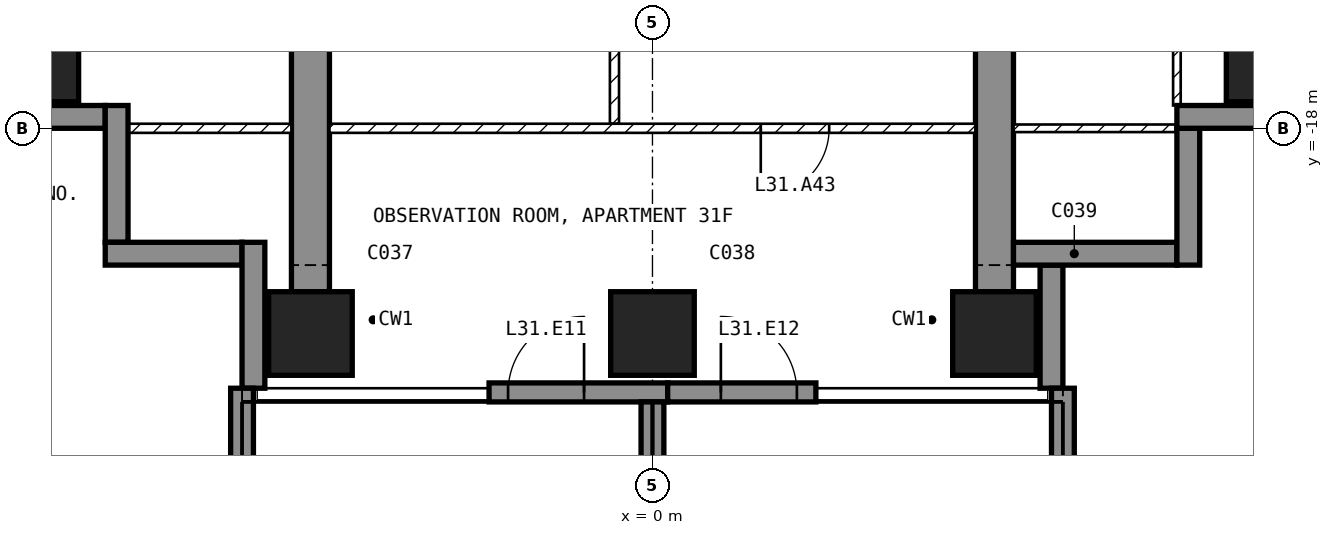
"""IFC4 building model, lengths in metres.
Left out: names, types, materials, properties, quantities, classifications, styles, units other than length and angle.
Written with IfcOpenShell. Run it as: python <this file> out.ifc"""

import sys

from ifc_helpers import new_model, si_unit, direction, frame, frame_2d, origin, origin_2d, place, context, subcontext, project, spatial, polyline, rectangle, outline, extrude, element, fill, save


model = new_model("IFC4")
c1 = context("Model", 3, precision=1e-05, world=origin(), true_north=direction((0.0, 1.0)))
c2 = subcontext(c1, "Body", "Model", "MODEL_VIEW")
j1 = project(units=[si_unit("LENGTHUNIT", "METRE"), si_unit("PLANEANGLEUNIT", "RADIAN")], contexts=[c1])
p1 = place(None, origin())
s1 = spatial("IfcSite", under=j1, at=p1, CompositionType="ELEMENT")
p2 = place(p1, origin())
s2 = spatial("IfcBuilding", under=s1, at=p2, CompositionType="ELEMENT")
p3 = place(p2, frame((0.0, 0.0, 130.4)))
s3 = spatial("IfcBuildingStorey", under=s2, at=p3, CompositionType="ELEMENT", Elevation=130.4)
for number, where, z_axis, x_axis in (
    (1, (-8.1, -17.1, -0.25), (0.0, 0.0, 1.0), (1.0, 0.0, 0.0)),
    (2, (-4.5, -20.7, -0.25), (0.0, 0.0, 1.0), (1.0, 0.0, 0.0)),
    (3, (0.0, -20.7, -0.25), (0.0, 0.0, 1.0), (1.0, 0.0, 0.0)),
    (4, (4.5, -20.7, -0.25), (0.0, 0.0, 1.0), (1.0, 0.0, 0.0)),
    (5, (8.1, -17.1, -0.25), (0.0, 0.0, 1.0), (1.0, 0.0, 0.0)),
):
    element("IfcColumn", number, at=place(p3, frame(where, z_axis=z_axis, x_axis=x_axis)), inside=s3, PredefinedType="COLUMN", context=c2, shape_type="SweptSolid", body=[
        extrude(rectangle(XDim=1.1, YDim=1.1, at=origin_2d()), origin(), (0.0, 0.0, 1.0), 3.5),
    ])
for number, where, z_axis, x_axis in (
    (6, (-4.75, -20.15, -0.25), (1.0, 0.0, 0.0), (0.0, 1.0, 0.0)),
    (7, (4.25, -20.15, -0.25), (1.0, 0.0, 0.0), (0.0, 1.0, 0.0)),
):
    element("IfcWall", number, at=place(p3, frame(where, z_axis=z_axis, x_axis=x_axis)), inside=s3, PredefinedType="SHEAR", context=c2, shape_type="SweptSolid", body=[
        extrude(outline(polyline([(0.0, 0.0), (6.65, 0.0), (6.65, 2.65), (9.05, 2.65), (9.05, 0.0), (11.15, 0.0), (11.15, 3.5), (0.0, 3.5), (0.0, 0.0)])), origin(), (0.0, 0.0, 1.0), 0.5),
    ])
p4 = place(p3, frame((-2.15, -21.475, 0.0), z_axis=(0.0, 0.0, 1.0), x_axis=(1.0, 0.0, 0.0)))
e8 = element("IfcWall", 8, at=p4, inside=s3, PredefinedType="SOLIDWALL", context=c2, shape_type="SweptSolid", body=[
    extrude(rectangle(XDim=2.35, YDim=0.25, at=frame_2d((1.175, 0.0))), origin(), (0.0, 0.0, 1.0), 3.25),
])
p5 = place(p4, frame((0.25, 0.0, 0.0)))
e9 = element("IfcOpeningElement", 9, at=p5, cuts=e8, PredefinedType="OPENING", context=c2, shape_type="SweptSolid", body=[
    extrude(rectangle(XDim=1.0, YDim=2.4, at=frame_2d((0.5, 1.2))), frame((0.0, 0.135, 0.0), z_axis=(0.0, -1.0, 0.0), x_axis=(1.0, 0.0, 0.0)), (0.0, 0.0, 1.0), 0.27),
])
p6 = place(p3, frame((0.2, -21.475, 0.0), z_axis=(0.0, 0.0, 1.0), x_axis=(1.0, 0.0, 0.0)))
e10 = element("IfcWall", 10, at=p6, inside=s3, PredefinedType="SOLIDWALL", context=c2, shape_type="SweptSolid", body=[
    extrude(rectangle(XDim=1.95, YDim=0.25, at=frame_2d((0.975, 0.0))), origin(), (0.0, 0.0, 1.0), 3.25),
])
p7 = place(p6, frame((0.7, 0.0, 0.0)))
e11 = element("IfcOpeningElement", 11, at=p7, cuts=e10, PredefinedType="OPENING", context=c2, shape_type="SweptSolid", body=[
    extrude(rectangle(XDim=1.0, YDim=2.4, at=frame_2d((0.5, 1.2))), frame((0.0, 0.135, 0.0), z_axis=(0.0, -1.0, 0.0), x_axis=(1.0, 0.0, 0.0)), (0.0, 0.0, 1.0), 0.27),
])
p8 = place(p3, frame((5.25, -21.42, 0.0), z_axis=(0.0, 0.0, 1.0), x_axis=(0.0, 1.0, 0.0)))
e12 = element("IfcWall", 12, at=p8, inside=s3, PredefinedType="SOLIDWALL", context=c2, shape_type="SweptSolid", body=[
    extrude(rectangle(XDim=1.62, YDim=0.3, at=frame_2d((0.81, 0.0))), origin(), (0.0, 0.0, 1.0), 3.25),
])
p9 = place(p3, frame((4.75, -19.65, 0.0), z_axis=(0.0, 0.0, 1.0), x_axis=(1.0, 0.0, 0.0)))
e13 = element("IfcWall", 13, at=p9, inside=s3, PredefinedType="SOLIDWALL", context=c2, shape_type="SweptSolid", body=[
    extrude(rectangle(XDim=2.15, YDim=0.3, at=frame_2d((1.075, 0.0))), origin(), (0.0, 0.0, 1.0), 3.25),
])
p10 = place(p3, frame((7.05, -19.8, 0.0), z_axis=(0.0, 0.0, 1.0), x_axis=(0.0, 1.0, 0.0)))
e14 = element("IfcWall", 14, at=p10, inside=s3, PredefinedType="SOLIDWALL", context=c2, shape_type="SweptSolid", body=[
    extrude(rectangle(XDim=1.8, YDim=0.3, at=frame_2d((0.9, 0.0))), origin(), (0.0, 0.0, 1.0), 3.25),
])
p11 = place(p3, frame((6.9, -17.85, 0.0), z_axis=(0.0, 0.0, 1.0), x_axis=(1.0, 0.0, 0.0)))
e15 = element("IfcWall", 15, at=p11, inside=s3, PredefinedType="SOLIDWALL", context=c2, shape_type="SweptSolid", body=[
    extrude(rectangle(XDim=1.85, YDim=0.3, at=frame_2d((0.925, 0.0))), origin(), (0.0, 0.0, 1.0), 3.25),
])
p12 = place(p3, frame((-8.75, -17.85, 0.0), z_axis=(0.0, 0.0, 1.0), x_axis=(1.0, 0.0, 0.0)))
e16 = element("IfcWall", 16, at=p12, inside=s3, PredefinedType="SOLIDWALL", context=c2, shape_type="SweptSolid", body=[
    extrude(rectangle(XDim=1.55, YDim=0.3, at=frame_2d((0.775, 0.0))), origin(), (0.0, 0.0, 1.0), 3.25),
])
for number, where, z_axis, x_axis in (
    (17, (-7.05, -17.7, 0.0), (0.0, 0.0, 1.0), (0.0, -1.0, 0.0)),
    (18, (-7.2, -19.65, 0.0), (0.0, 0.0, 1.0), (1.0, 0.0, 0.0)),
):
    element("IfcWall", number, at=place(p3, frame(where, z_axis=z_axis, x_axis=x_axis)), inside=s3, PredefinedType="SOLIDWALL", context=c2, shape_type="SweptSolid", body=[
        extrude(rectangle(XDim=1.8, YDim=0.3, at=frame_2d((0.9, 0.0))), origin(), (0.0, 0.0, 1.0), 3.25),
    ])
p13 = place(p3, frame((-5.25, -19.5, 0.0), z_axis=(0.0, 0.0, 1.0), x_axis=(0.0, -1.0, 0.0)))
e19 = element("IfcWall", 19, at=p13, inside=s3, PredefinedType="SOLIDWALL", context=c2, shape_type="SweptSolid", body=[
    extrude(rectangle(XDim=1.92, YDim=0.3, at=frame_2d((0.96, 0.0))), origin(), (0.0, 0.0, 1.0), 3.25),
])
p14 = place(p3, frame((-5.4, -21.42, 0.0), z_axis=(0.0, 0.0, 1.0), x_axis=(0.0, -1.0, 0.0)))
e20 = element("IfcWall", 20, at=p14, inside=s3, PredefinedType="SOLIDWALL", context=c2, shape_type="SweptSolid", body=[
    extrude(rectangle(XDim=2.88, YDim=0.3, at=frame_2d((1.44, 0.0))), origin(), (0.0, 0.0, 1.0), 3.25),
])
p15 = place(p3, frame((0.0, -21.6, 0.0), z_axis=(0.0, 0.0, 1.0), x_axis=(0.0, -1.0, 0.0)))
e21 = element("IfcWall", 21, at=p15, inside=s3, PredefinedType="SOLIDWALL", context=c2, shape_type="SweptSolid", body=[
    extrude(rectangle(XDim=2.7, YDim=0.3, at=frame_2d((1.35, 0.0))), origin(), (0.0, 0.0, 1.0), 3.25),
])
p16 = place(p3, frame((5.4, -21.42, 0.0), z_axis=(0.0, 0.0, 1.0), x_axis=(0.0, -1.0, 0.0)))
e22 = element("IfcWall", 22, at=p16, inside=s3, PredefinedType="SOLIDWALL", context=c2, shape_type="SweptSolid", body=[
    extrude(rectangle(XDim=2.88, YDim=0.3, at=frame_2d((1.44, 0.0))), origin(), (0.0, 0.0, 1.0), 3.25),
])
p17 = place(p3, frame((-0.5, -17.94, 0.0), z_axis=(0.0, 0.0, 1.0), x_axis=(0.0, 1.0, 0.0)))
e23 = element("IfcWall", 23, at=p17, inside=s3, PredefinedType="PARTITIONING", context=c2, shape_type="SweptSolid", body=[
    extrude(rectangle(XDim=2.88, YDim=0.12, at=frame_2d((1.44, 0.0))), origin(), (0.0, 0.0, 1.0), 3.25),
])
p18 = place(p17, frame((0.99, 0.0, 0.0)))
e24 = element("IfcOpeningElement", 24, at=p18, cuts=e23, PredefinedType="OPENING", context=c2, shape_type="SweptSolid", body=[
    extrude(rectangle(XDim=0.9, YDim=2.1, at=frame_2d((0.45, 1.05))), frame((0.0, 0.07, 0.0), z_axis=(0.0, -1.0, 0.0), x_axis=(1.0, 0.0, 0.0)), (0.0, 0.0, 1.0), 0.14),
])
p19 = place(p3, frame((4.25, -18.0, 0.0), z_axis=(0.0, 0.0, 1.0), x_axis=(-1.0, 0.0, 0.0)))
e25 = element("IfcWall", 25, at=p19, inside=s3, PredefinedType="PARTITIONING", context=c2, shape_type="SweptSolid", body=[
    extrude(rectangle(XDim=8.5, YDim=0.12, at=frame_2d((4.25, 0.0))), origin(), (0.0, 0.0, 1.0), 3.25),
])
p20 = place(p19, frame((1.925, 0.0, 0.0)))
e26 = element("IfcOpeningElement", 26, at=p20, cuts=e25, PredefinedType="OPENING", context=c2, shape_type="SweptSolid", body=[
    extrude(rectangle(XDim=0.9, YDim=2.1, at=frame_2d((0.45, 1.05))), frame((0.0, 0.07, 0.0), z_axis=(0.0, -1.0, 0.0), x_axis=(1.0, 0.0, 0.0)), (0.0, 0.0, 1.0), 0.14),
])
p21 = place(p3, frame((6.9, -17.7, 0.0), z_axis=(0.0, 0.0, 1.0), x_axis=(0.0, 1.0, 0.0)))
e27 = element("IfcWall", 27, at=p21, inside=s3, PredefinedType="PARTITIONING", context=c2, shape_type="SweptSolid", body=[
    extrude(rectangle(XDim=3.25, YDim=0.1, at=frame_2d((1.625, 0.0))), origin(), (0.0, 0.0, 1.0), 3.25),
])
p22 = place(p21, frame((2.2, 0.0, 0.0)))
e28 = element("IfcOpeningElement", 28, at=p22, cuts=e27, PredefinedType="OPENING", context=c2, shape_type="SweptSolid", body=[
    extrude(rectangle(XDim=0.85, YDim=2.1, at=frame_2d((0.425, 1.05))), frame((0.0, 0.06, 0.0), z_axis=(0.0, -1.0, 0.0), x_axis=(1.0, 0.0, 0.0)), (0.0, 0.0, 1.0), 0.12),
])
p23 = place(p3, frame((7.12, -18.0, 0.0), z_axis=(0.0, 0.0, 1.0), x_axis=(-1.0, 0.0, 0.0)))
e29 = element("IfcWall", 29, at=p23, inside=s3, PredefinedType="PARTITIONING", context=c2, shape_type="SweptSolid", body=[
    extrude(rectangle(XDim=2.37, YDim=0.1, at=frame_2d((1.185, 0.0))), origin(), (0.0, 0.0, 1.0), 3.25),
])
p24 = place(p3, frame((-4.75, -18.0, 0.0), z_axis=(0.0, 0.0, 1.0), x_axis=(-1.0, 0.0, 0.0)))
e30 = element("IfcWall", 30, at=p24, inside=s3, PredefinedType="PARTITIONING", context=c2, shape_type="SweptSolid", body=[
    extrude(rectangle(XDim=2.37, YDim=0.12, at=frame_2d((1.185, 0.0))), origin(), (0.0, 0.0, 1.0), 3.25),
])
p25 = place(p5, origin())
e31 = element("IfcDoor", 31, at=p25, inside=s3, OperationType="SINGLE_SWING_RIGHT", PredefinedType="DOOR", context=c2, shape_type="SweptSolid", body=[
    extrude(rectangle(XDim=1.0, YDim=2.4, at=frame_2d((0.5, 1.2))), frame((0.0, 0.025, 0.0), z_axis=(0.0, -1.0, 0.0), x_axis=(1.0, 0.0, 0.0)), (0.0, 0.0, 1.0), 0.05),
])
fill(e9, e31)
p26 = place(p7, origin())
e32 = element("IfcDoor", 32, at=p26, inside=s3, OperationType="SINGLE_SWING_LEFT", PredefinedType="DOOR", context=c2, shape_type="SweptSolid", body=[
    extrude(rectangle(XDim=1.0, YDim=2.4, at=frame_2d((0.5, 1.2))), frame((0.0, 0.025, 0.0), z_axis=(0.0, -1.0, 0.0), x_axis=(1.0, 0.0, 0.0)), (0.0, 0.0, 1.0), 0.05),
])
fill(e11, e32)
p27 = place(p20, origin())
e33 = element("IfcDoor", 33, at=p27, inside=s3, OperationType="SINGLE_SWING_RIGHT", PredefinedType="DOOR", context=c2, shape_type="SweptSolid", body=[
    extrude(rectangle(XDim=0.9, YDim=2.1, at=frame_2d((0.45, 1.05))), frame((0.0, 0.025, 0.0), z_axis=(0.0, -1.0, 0.0), x_axis=(1.0, 0.0, 0.0)), (0.0, 0.0, 1.0), 0.05),
])
fill(e26, e33)
save(model, sys.argv[1])
